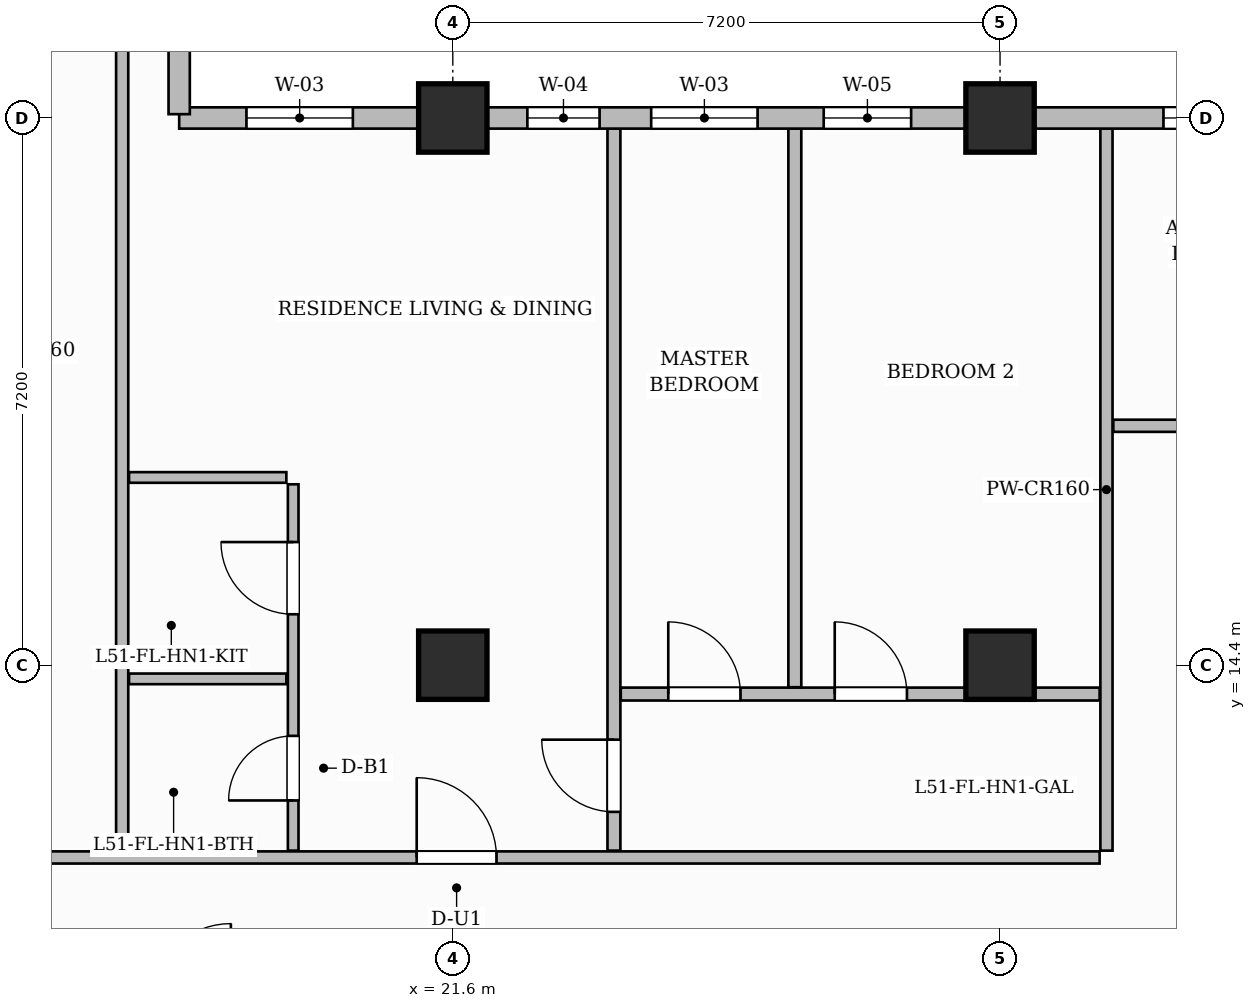
"""IFC4 building model, lengths in metres.
Left out: names, types, materials, properties, quantities, classifications, styles, units other than length and angle.
Written with IfcOpenShell. Run it as: python <this file> out.ifc"""

import sys

from ifc_helpers import new_model, si_unit, direction, frame, frame_2d, origin, origin_2d, place, context, subcontext, project, spatial, rectangle, extrude, source, transform, mapped, element, fill, save


model = new_model("IFC4")
c1 = context("Model", 3, precision=1e-05, world=origin(), true_north=direction((0.0, 1.0)))
c2 = subcontext(c1, "Body", "Model", "MODEL_VIEW")
j1 = project(units=[si_unit("LENGTHUNIT", "METRE"), si_unit("PLANEANGLEUNIT", "RADIAN")], contexts=[c1])
p1 = place(None, origin())
s1 = spatial("IfcSite", under=j1, at=p1, CompositionType="ELEMENT")
p2 = place(p1, origin())
s2 = spatial("IfcBuilding", under=s1, at=p2, CompositionType="ELEMENT")
p3 = place(p2, frame((0.0, 0.0, 205.75)))
s3 = spatial("IfcBuildingStorey", under=s2, at=p3, CompositionType="ELEMENT", Elevation=205.75)
m1 = source(origin(), c2, "Body", "SweptSolid", [
    extrude(rectangle(XDim=0.9, YDim=0.9, at=origin_2d()), origin(), (0.0, 0.0, 1.0), 3.85),
])
for number, where, z_axis, x_axis in (
    (1, (21.6, 14.4, 0.0), (0.0, 0.0, 1.0), (1.0, 0.0, 0.0)),
    (2, (21.6, 21.6, 0.0), (0.0, 0.0, 1.0), (1.0, 0.0, 0.0)),
    (3, (28.8, 14.4, 0.0), (0.0, 0.0, 1.0), (1.0, 0.0, 0.0)),
    (4, (28.8, 21.6, 0.0), (0.0, 0.0, 1.0), (1.0, 0.0, 0.0)),
):
    element("IfcColumn", number, at=place(p3, frame(where, z_axis=z_axis, x_axis=x_axis)), inside=s3, PredefinedType="COLUMN", context=c2, shape_type="MappedRepresentation", body=[
        mapped(m1, transform((0.0, 0.0, 0.0), scale=1.0)),
    ])
p4 = place(p3, frame((14.548, 11.87, 0.0), z_axis=(0.0, 0.0, 1.0), x_axis=(1.0, 0.0, 0.0)))
e5 = element("IfcWall", 5, at=p4, inside=s3, PredefinedType="PARTITIONING", context=c2, shape_type="SweptSolid", body=[
    extrude(rectangle(XDim=15.562, YDim=0.16, at=frame_2d((7.781, 0.0))), origin(), (0.0, 0.0, 1.0), 3.6),
])
p5 = place(p4, frame((6.577, 0.0, 0.0)))
e6 = element("IfcOpeningElement", 6, at=p5, cuts=e5, PredefinedType="OPENING", context=c2, shape_type="SweptSolid", body=[
    extrude(rectangle(XDim=1.05, YDim=2.25, at=frame_2d((0.525, 1.125))), frame((0.0, 0.09, 0.0), z_axis=(0.0, -1.0, 0.0), x_axis=(1.0, 0.0, 0.0)), (0.0, 0.0, 1.0), 0.18),
])
p6 = place(p3, frame((30.2, 11.96, 0.0), z_axis=(0.0, 0.0, 1.0), x_axis=(0.0, 1.0, 0.0)))
e7 = element("IfcWall", 7, at=p6, inside=s3, PredefinedType="PARTITIONING", context=c2, shape_type="SweptSolid", body=[
    extrude(rectangle(XDim=9.5, YDim=0.16, at=frame_2d((4.75, 0.0))), origin(), (0.0, 0.0, 1.0), 3.6),
])
p7 = place(p3, frame((30.29, 17.55, 0.0), z_axis=(0.0, 0.0, 1.0), x_axis=(1.0, 0.0, 0.0)))
e8 = element("IfcWall", 8, at=p7, inside=s3, PredefinedType="PARTITIONING", context=c2, shape_type="SweptSolid", body=[
    extrude(rectangle(XDim=19.37, YDim=0.16, at=frame_2d((9.685, 0.0))), origin(), (0.0, 0.0, 1.0), 3.6),
])
p8 = place(p7, frame((1.135, 0.0, 0.0)))
e9 = element("IfcOpeningElement", 9, at=p8, cuts=e8, PredefinedType="OPENING", context=c2, shape_type="SweptSolid", body=[
    extrude(rectangle(XDim=0.85, YDim=2.1, at=frame_2d((0.425, 1.05))), frame((0.0, 0.09, 0.0), z_axis=(0.0, -1.0, 0.0), x_axis=(1.0, 0.0, 0.0)), (0.0, 0.0, 1.0), 0.18),
])
p9 = place(p7, frame((5.71, 0.0, 0.0)))
e10 = element("IfcOpeningElement", 10, at=p9, cuts=e8, PredefinedType="OPENING", context=c2, shape_type="SweptSolid", body=[
    extrude(rectangle(XDim=0.9, YDim=2.15, at=frame_2d((0.45, 1.075))), frame((0.0, 0.09, 0.0), z_axis=(0.0, -1.0, 0.0), x_axis=(1.0, 0.0, 0.0)), (0.0, 0.0, 1.0), 0.18),
])
p10 = place(p7, frame((10.635, 0.0, 0.0)))
e11 = element("IfcOpeningElement", 11, at=p10, cuts=e8, PredefinedType="OPENING", context=c2, shape_type="SweptSolid", body=[
    extrude(rectangle(XDim=0.95, YDim=2.15, at=frame_2d((0.475, 1.075))), frame((0.0, 0.09, 0.0), z_axis=(0.0, -1.0, 0.0), x_axis=(1.0, 0.0, 0.0)), (0.0, 0.0, 1.0), 0.18),
])
p11 = place(p7, frame((16.235, 0.0, 0.0)))
e12 = element("IfcOpeningElement", 12, at=p11, cuts=e8, PredefinedType="OPENING", context=c2, shape_type="SweptSolid", body=[
    extrude(rectangle(XDim=0.95, YDim=2.15, at=frame_2d((0.475, 1.075))), frame((0.0, 0.09, 0.0), z_axis=(0.0, -1.0, 0.0), x_axis=(1.0, 0.0, 0.0)), (0.0, 0.0, 1.0), 0.18),
])
p12 = place(p3, frame((17.25, 11.96, 0.0), z_axis=(0.0, 0.0, 1.0), x_axis=(0.0, 1.0, 0.0)))
e13 = element("IfcWall", 13, at=p12, inside=s3, PredefinedType="PARTITIONING", context=c2, shape_type="SweptSolid", body=[
    extrude(rectangle(XDim=13.15, YDim=0.16, at=frame_2d((6.575, 0.0))), origin(), (0.0, 0.0, 1.0), 3.6),
])
p13 = place(p3, frame((19.5, 11.96, 0.0), z_axis=(0.0, 0.0, 1.0), x_axis=(0.0, 1.0, 0.0)))
e14 = element("IfcWall", 14, at=p13, inside=s3, PredefinedType="PARTITIONING", context=c2, shape_type="SweptSolid", body=[
    extrude(rectangle(XDim=4.82, YDim=0.14, at=frame_2d((2.41, 0.0))), origin(), (0.0, 0.0, 1.0), 3.6),
])
p14 = place(p13, frame((0.66, 0.0, 0.0)))
e15 = element("IfcOpeningElement", 15, at=p14, cuts=e14, PredefinedType="OPENING", context=c2, shape_type="SweptSolid", body=[
    extrude(rectangle(XDim=0.85, YDim=2.1, at=frame_2d((0.425, 1.05))), frame((0.0, 0.08, 0.0), z_axis=(0.0, -1.0, 0.0), x_axis=(1.0, 0.0, 0.0)), (0.0, 0.0, 1.0), 0.16),
])
p15 = place(p13, frame((3.11, 0.0, 0.0)))
e16 = element("IfcOpeningElement", 16, at=p15, cuts=e14, PredefinedType="OPENING", context=c2, shape_type="SweptSolid", body=[
    extrude(rectangle(XDim=0.95, YDim=2.15, at=frame_2d((0.475, 1.075))), frame((0.0, 0.08, 0.0), z_axis=(0.0, -1.0, 0.0), x_axis=(1.0, 0.0, 0.0)), (0.0, 0.0, 1.0), 0.16),
])
p16 = place(p3, frame((17.34, 14.22, 0.0), z_axis=(0.0, 0.0, 1.0), x_axis=(1.0, 0.0, 0.0)))
e17 = element("IfcWall", 17, at=p16, inside=s3, PredefinedType="PARTITIONING", context=c2, shape_type="SweptSolid", body=[
    extrude(rectangle(XDim=2.07, YDim=0.14, at=frame_2d((1.035, 0.0))), origin(), (0.0, 0.0, 1.0), 3.085),
])
p17 = place(p3, frame((17.34, 16.87, 0.0), z_axis=(0.0, 0.0, 1.0), x_axis=(1.0, 0.0, 0.0)))
e18 = element("IfcWall", 18, at=p17, inside=s3, PredefinedType="PARTITIONING", context=c2, shape_type="SweptSolid", body=[
    extrude(rectangle(XDim=2.07, YDim=0.14, at=frame_2d((1.035, 0.0))), origin(), (0.0, 0.0, 1.0), 3.6),
])
p18 = place(p3, frame((23.72, 11.96, 0.0), z_axis=(0.0, 0.0, 1.0), x_axis=(0.0, 1.0, 0.0)))
e19 = element("IfcWall", 19, at=p18, inside=s3, PredefinedType="PARTITIONING", context=c2, shape_type="SweptSolid", body=[
    extrude(rectangle(XDim=9.5, YDim=0.17, at=frame_2d((4.75, 0.0))), origin(), (0.0, 0.0, 1.0), 3.6),
])
p19 = place(p18, frame((0.51, 0.0, 0.0)))
e20 = element("IfcOpeningElement", 20, at=p19, cuts=e19, PredefinedType="OPENING", context=c2, shape_type="SweptSolid", body=[
    extrude(rectangle(XDim=0.95, YDim=2.15, at=frame_2d((0.475, 1.075))), frame((0.0, 0.095, 0.0), z_axis=(0.0, -1.0, 0.0), x_axis=(1.0, 0.0, 0.0)), (0.0, 0.0, 1.0), 0.19),
])
p20 = place(p3, frame((23.81, 14.02, 0.0), z_axis=(0.0, 0.0, 1.0), x_axis=(1.0, 0.0, 0.0)))
e21 = element("IfcWall", 21, at=p20, inside=s3, PredefinedType="PARTITIONING", context=c2, shape_type="SweptSolid", body=[
    extrude(rectangle(XDim=6.3, YDim=0.17, at=frame_2d((3.15, 0.0))), origin(), (0.0, 0.0, 1.0), 3.6),
])
p21 = place(p20, frame((0.625, 0.0, 0.0)))
e22 = element("IfcOpeningElement", 22, at=p21, cuts=e21, PredefinedType="OPENING", context=c2, shape_type="SweptSolid", body=[
    extrude(rectangle(XDim=0.95, YDim=2.15, at=frame_2d((0.475, 1.075))), frame((0.0, 0.095, 0.0), z_axis=(0.0, -1.0, 0.0), x_axis=(1.0, 0.0, 0.0)), (0.0, 0.0, 1.0), 0.19),
])
p22 = place(p20, frame((2.815, 0.0, 0.0)))
e23 = element("IfcOpeningElement", 23, at=p22, cuts=e21, PredefinedType="OPENING", context=c2, shape_type="SweptSolid", body=[
    extrude(rectangle(XDim=0.95, YDim=2.15, at=frame_2d((0.475, 1.075))), frame((0.0, 0.095, 0.0), z_axis=(0.0, -1.0, 0.0), x_axis=(1.0, 0.0, 0.0)), (0.0, 0.0, 1.0), 0.19),
])
p23 = place(p3, frame((26.1, 14.11, 0.0), z_axis=(0.0, 0.0, 1.0), x_axis=(0.0, 1.0, 0.0)))
e24 = element("IfcWall", 24, at=p23, inside=s3, PredefinedType="PARTITIONING", context=c2, shape_type="SweptSolid", body=[
    extrude(rectangle(XDim=7.35, YDim=0.17, at=frame_2d((3.675, 0.0))), origin(), (0.0, 0.0, 1.0), 3.6),
])
p24 = place(p3, frame((18.0, 21.6, 0.0), z_axis=(0.0, 0.0, 1.0), x_axis=(1.0, 0.0, 0.0)))
e25 = element("IfcWall", 25, at=p24, inside=s3, PredefinedType="SOLIDWALL", context=c2, shape_type="SweptSolid", body=[
    extrude(rectangle(XDim=31.8, YDim=0.28, at=frame_2d((15.9, 0.0))), origin(), (0.0, 0.0, 1.0), 3.085),
])
p25 = place(p24, frame((0.885, 0.0, 0.8)))
e26 = element("IfcOpeningElement", 26, at=p25, cuts=e25, PredefinedType="OPENING", context=c2, shape_type="SweptSolid", body=[
    extrude(rectangle(XDim=1.4, YDim=1.85, at=frame_2d((0.7, 0.925))), frame((0.0, 0.15, 0.0), z_axis=(0.0, -1.0, 0.0), x_axis=(1.0, 0.0, 0.0)), (0.0, 0.0, 1.0), 0.3),
])
p26 = place(p24, frame((4.581, 0.0, 0.8)))
e27 = element("IfcOpeningElement", 27, at=p26, cuts=e25, PredefinedType="OPENING", context=c2, shape_type="SweptSolid", body=[
    extrude(rectangle(XDim=0.95, YDim=1.75, at=frame_2d((0.475, 0.875))), frame((0.0, 0.15, 0.0), z_axis=(0.0, -1.0, 0.0), x_axis=(1.0, 0.0, 0.0)), (0.0, 0.0, 1.0), 0.3),
])
p27 = place(p24, frame((6.21, 0.0, 0.8)))
e28 = element("IfcOpeningElement", 28, at=p27, cuts=e25, PredefinedType="OPENING", context=c2, shape_type="SweptSolid", body=[
    extrude(rectangle(XDim=1.4, YDim=1.85, at=frame_2d((0.7, 0.925))), frame((0.0, 0.15, 0.0), z_axis=(0.0, -1.0, 0.0), x_axis=(1.0, 0.0, 0.0)), (0.0, 0.0, 1.0), 0.3),
])
p28 = place(p24, frame((8.48, 0.0, 0.8)))
e29 = element("IfcOpeningElement", 29, at=p28, cuts=e25, PredefinedType="OPENING", context=c2, shape_type="SweptSolid", body=[
    extrude(rectangle(XDim=1.15, YDim=1.8, at=frame_2d((0.575, 0.9))), frame((0.0, 0.15, 0.0), z_axis=(0.0, -1.0, 0.0), x_axis=(1.0, 0.0, 0.0)), (0.0, 0.0, 1.0), 0.3),
])
p29 = place(p24, frame((12.95, 0.0, 0.8)))
e30 = element("IfcOpeningElement", 30, at=p29, cuts=e25, PredefinedType="OPENING", context=c2, shape_type="SweptSolid", body=[
    extrude(rectangle(XDim=1.8, YDim=1.85, at=frame_2d((0.9, 0.925))), frame((0.0, 0.15, 0.0), z_axis=(0.0, -1.0, 0.0), x_axis=(1.0, 0.0, 0.0)), (0.0, 0.0, 1.0), 0.3),
])
p30 = place(p24, frame((18.596, 0.0, 0.8)))
e31 = element("IfcOpeningElement", 31, at=p30, cuts=e25, PredefinedType="OPENING", context=c2, shape_type="SweptSolid", body=[
    extrude(rectangle(XDim=1.8, YDim=1.85, at=frame_2d((0.9, 0.925))), frame((0.0, 0.15, 0.0), z_axis=(0.0, -1.0, 0.0), x_axis=(1.0, 0.0, 0.0)), (0.0, 0.0, 1.0), 0.3),
])
p31 = place(p24, frame((21.729, 0.0, 0.8)))
e32 = element("IfcOpeningElement", 32, at=p31, cuts=e25, PredefinedType="OPENING", context=c2, shape_type="SweptSolid", body=[
    extrude(rectangle(XDim=1.15, YDim=1.8, at=frame_2d((0.575, 0.9))), frame((0.0, 0.15, 0.0), z_axis=(0.0, -1.0, 0.0), x_axis=(1.0, 0.0, 0.0)), (0.0, 0.0, 1.0), 0.3),
])
p32 = place(p24, frame((25.121, 0.0, 0.8)))
e33 = element("IfcOpeningElement", 33, at=p32, cuts=e25, PredefinedType="OPENING", context=c2, shape_type="SweptSolid", body=[
    extrude(rectangle(XDim=0.95, YDim=1.75, at=frame_2d((0.475, 0.875))), frame((0.0, 0.15, 0.0), z_axis=(0.0, -1.0, 0.0), x_axis=(1.0, 0.0, 0.0)), (0.0, 0.0, 1.0), 0.3),
])
p33 = place(p24, frame((27.804, 0.0, 0.8)))
e34 = element("IfcOpeningElement", 34, at=p33, cuts=e25, PredefinedType="OPENING", context=c2, shape_type="SweptSolid", body=[
    extrude(rectangle(XDim=1.8, YDim=1.85, at=frame_2d((0.9, 0.925))), frame((0.0, 0.15, 0.0), z_axis=(0.0, -1.0, 0.0), x_axis=(1.0, 0.0, 0.0)), (0.0, 0.0, 1.0), 0.3),
])
p34 = place(p3, frame((18.0, 21.65, 0.0), z_axis=(0.0, 0.0, 1.0), x_axis=(0.0, 1.0, 0.0)))
e35 = element("IfcWall", 35, at=p34, inside=s3, PredefinedType="SOLIDWALL", context=c2, shape_type="SweptSolid", body=[
    extrude(rectangle(XDim=25.1, YDim=0.28, at=frame_2d((12.55, 0.0))), origin(), (0.0, 0.0, 1.0), 3.6),
])
p35 = place(p34, frame((12.706, 0.0, 0.0)))
e36 = element("IfcOpeningElement", 36, at=p35, cuts=e35, PredefinedType="OPENING", context=c2, shape_type="SweptSolid", body=[
    extrude(rectangle(XDim=1.2, YDim=2.2, at=frame_2d((0.6, 1.1))), frame((0.0, 0.15, 0.0), z_axis=(0.0, -1.0, 0.0), x_axis=(1.0, 0.0, 0.0)), (0.0, 0.0, 1.0), 0.3),
])
p36 = place(p34, frame((1.89, 0.0, 0.8)))
e37 = element("IfcOpeningElement", 37, at=p36, cuts=e35, PredefinedType="OPENING", context=c2, shape_type="SweptSolid", body=[
    extrude(rectangle(XDim=1.8, YDim=1.85, at=frame_2d((0.9, 0.925))), frame((0.0, 0.15, 0.0), z_axis=(0.0, -1.0, 0.0), x_axis=(1.0, 0.0, 0.0)), (0.0, 0.0, 1.0), 0.3),
])
p37 = place(p34, frame((6.63, 0.0, 0.8)))
e38 = element("IfcOpeningElement", 38, at=p37, cuts=e35, PredefinedType="OPENING", context=c2, shape_type="SweptSolid", body=[
    extrude(rectangle(XDim=1.8, YDim=1.85, at=frame_2d((0.9, 0.925))), frame((0.0, 0.15, 0.0), z_axis=(0.0, -1.0, 0.0), x_axis=(1.0, 0.0, 0.0)), (0.0, 0.0, 1.0), 0.3),
])
p38 = place(p34, frame((14.778, 0.0, 0.8)))
e39 = element("IfcOpeningElement", 39, at=p38, cuts=e35, PredefinedType="OPENING", context=c2, shape_type="SweptSolid", body=[
    extrude(rectangle(XDim=1.8, YDim=1.85, at=frame_2d((0.9, 0.925))), frame((0.0, 0.15, 0.0), z_axis=(0.0, -1.0, 0.0), x_axis=(1.0, 0.0, 0.0)), (0.0, 0.0, 1.0), 0.3),
])
p39 = place(p34, frame((19.275, 0.0, 0.8)))
e40 = element("IfcOpeningElement", 40, at=p39, cuts=e35, PredefinedType="OPENING", context=c2, shape_type="SweptSolid", body=[
    extrude(rectangle(XDim=1.8, YDim=1.85, at=frame_2d((0.9, 0.925))), frame((0.0, 0.15, 0.0), z_axis=(0.0, -1.0, 0.0), x_axis=(1.0, 0.0, 0.0)), (0.0, 0.0, 1.0), 0.3),
])
p40 = place(p34, frame((22.025, 0.0, 0.8)))
e41 = element("IfcOpeningElement", 41, at=p40, cuts=e35, PredefinedType="OPENING", context=c2, shape_type="SweptSolid", body=[
    extrude(rectangle(XDim=1.8, YDim=1.85, at=frame_2d((0.9, 0.925))), frame((0.0, 0.15, 0.0), z_axis=(0.0, -1.0, 0.0), x_axis=(1.0, 0.0, 0.0)), (0.0, 0.0, 1.0), 0.3),
])
m2 = source(origin(), c2, "Body", "SweptSolid", [
    extrude(rectangle(XDim=0.85, YDim=2.1, at=frame_2d((0.425, 1.05))), frame((0.0, 0.025, 0.0), z_axis=(0.0, -1.0, 0.0), x_axis=(1.0, 0.0, 0.0)), (0.0, 0.0, 1.0), 0.05),
])
p41 = place(p14, origin())
e42 = element("IfcDoor", 42, at=p41, inside=s3, OperationType="SINGLE_SWING_LEFT", PredefinedType="DOOR", context=c2, shape_type="MappedRepresentation", body=[
    mapped(m2, transform((0.0, 0.0, 0.0), scale=1.0)),
])
fill(e15, e42)
m3 = source(origin(), c2, "Body", "SweptSolid", [
    extrude(rectangle(XDim=0.95, YDim=2.15, at=frame_2d((0.475, 1.075))), frame((0.0, 0.025, 0.0), z_axis=(0.0, -1.0, 0.0), x_axis=(1.0, 0.0, 0.0)), (0.0, 0.0, 1.0), 0.05),
])
p42 = place(p15, origin())
e43 = element("IfcDoor", 43, at=p42, inside=s3, OperationType="SINGLE_SWING_RIGHT", PredefinedType="DOOR", context=c2, shape_type="MappedRepresentation", body=[
    mapped(m3, transform((0.0, 0.0, 0.0), scale=1.0)),
])
fill(e16, e43)
m4 = source(origin(), c2, "Body", "SweptSolid", [
    extrude(rectangle(XDim=1.05, YDim=2.25, at=frame_2d((0.525, 1.125))), frame((0.0, 0.025, 0.0), z_axis=(0.0, -1.0, 0.0), x_axis=(1.0, 0.0, 0.0)), (0.0, 0.0, 1.0), 0.05),
])
p43 = place(p5, origin())
e44 = element("IfcDoor", 44, at=p43, inside=s3, OperationType="SINGLE_SWING_LEFT", PredefinedType="DOOR", context=c2, shape_type="MappedRepresentation", body=[
    mapped(m4, transform((0.0, 0.0, 0.0), scale=1.0)),
])
fill(e6, e44)
p44 = place(p19, origin())
e45 = element("IfcDoor", 45, at=p44, inside=s3, OperationType="SINGLE_SWING_RIGHT", PredefinedType="DOOR", context=c2, shape_type="MappedRepresentation", body=[
    mapped(m3, transform((0.0, 0.0, 0.0), scale=1.0)),
])
fill(e20, e45)
p45 = place(p21, origin())
e46 = element("IfcDoor", 46, at=p45, inside=s3, OperationType="SINGLE_SWING_LEFT", PredefinedType="DOOR", context=c2, shape_type="MappedRepresentation", body=[
    mapped(m3, transform((0.0, 0.0, 0.0), scale=1.0)),
])
fill(e22, e46)
p46 = place(p22, origin())
e47 = element("IfcDoor", 47, at=p46, inside=s3, OperationType="SINGLE_SWING_LEFT", PredefinedType="DOOR", context=c2, shape_type="MappedRepresentation", body=[
    mapped(m3, transform((0.0, 0.0, 0.0), scale=1.0)),
])
fill(e23, e47)
m5 = source(origin(), c2, "Body", "SweptSolid", [
    extrude(rectangle(XDim=1.4, YDim=1.85, at=frame_2d((0.7, 0.925))), frame((0.0, 0.03, 0.0), z_axis=(0.0, -1.0, 0.0), x_axis=(1.0, 0.0, 0.0)), (0.0, 0.0, 1.0), 0.06),
])
p47 = place(p25, origin())
e48 = element("IfcWindow", 48, at=p47, inside=s3, PartitioningType="SINGLE_PANEL", PredefinedType="WINDOW", context=c2, shape_type="MappedRepresentation", body=[
    mapped(m5, transform((0.0, 0.0, 0.0), scale=1.0)),
])
fill(e26, e48)
m6 = source(origin(), c2, "Body", "SweptSolid", [
    extrude(rectangle(XDim=0.95, YDim=1.75, at=frame_2d((0.475, 0.875))), frame((0.0, 0.03, 0.0), z_axis=(0.0, -1.0, 0.0), x_axis=(1.0, 0.0, 0.0)), (0.0, 0.0, 1.0), 0.06),
])
p48 = place(p26, origin())
e49 = element("IfcWindow", 49, at=p48, inside=s3, PartitioningType="SINGLE_PANEL", PredefinedType="WINDOW", context=c2, shape_type="MappedRepresentation", body=[
    mapped(m6, transform((0.0, 0.0, 0.0), scale=1.0)),
])
fill(e27, e49)
p49 = place(p27, origin())
e50 = element("IfcWindow", 50, at=p49, inside=s3, PartitioningType="SINGLE_PANEL", PredefinedType="WINDOW", context=c2, shape_type="MappedRepresentation", body=[
    mapped(m5, transform((0.0, 0.0, 0.0), scale=1.0)),
])
fill(e28, e50)
m7 = source(origin(), c2, "Body", "SweptSolid", [
    extrude(rectangle(XDim=1.15, YDim=1.8, at=frame_2d((0.575, 0.9))), frame((0.0, 0.03, 0.0), z_axis=(0.0, -1.0, 0.0), x_axis=(1.0, 0.0, 0.0)), (0.0, 0.0, 1.0), 0.06),
])
p50 = place(p28, origin())
e51 = element("IfcWindow", 51, at=p50, inside=s3, PartitioningType="SINGLE_PANEL", PredefinedType="WINDOW", context=c2, shape_type="MappedRepresentation", body=[
    mapped(m7, transform((0.0, 0.0, 0.0), scale=1.0)),
])
fill(e29, e51)
m8 = source(origin(), c2, "Body", "SweptSolid", [
    extrude(rectangle(XDim=1.8, YDim=1.85, at=frame_2d((0.9, 0.925))), frame((0.0, 0.03, 0.0), z_axis=(0.0, -1.0, 0.0), x_axis=(1.0, 0.0, 0.0)), (0.0, 0.0, 1.0), 0.06),
])
p51 = place(p29, origin())
e52 = element("IfcWindow", 52, at=p51, inside=s3, PartitioningType="DOUBLE_PANEL_VERTICAL", PredefinedType="WINDOW", context=c2, shape_type="MappedRepresentation", body=[
    mapped(m8, transform((0.0, 0.0, 0.0), scale=1.0)),
])
fill(e30, e52)
save(model, sys.argv[1])
